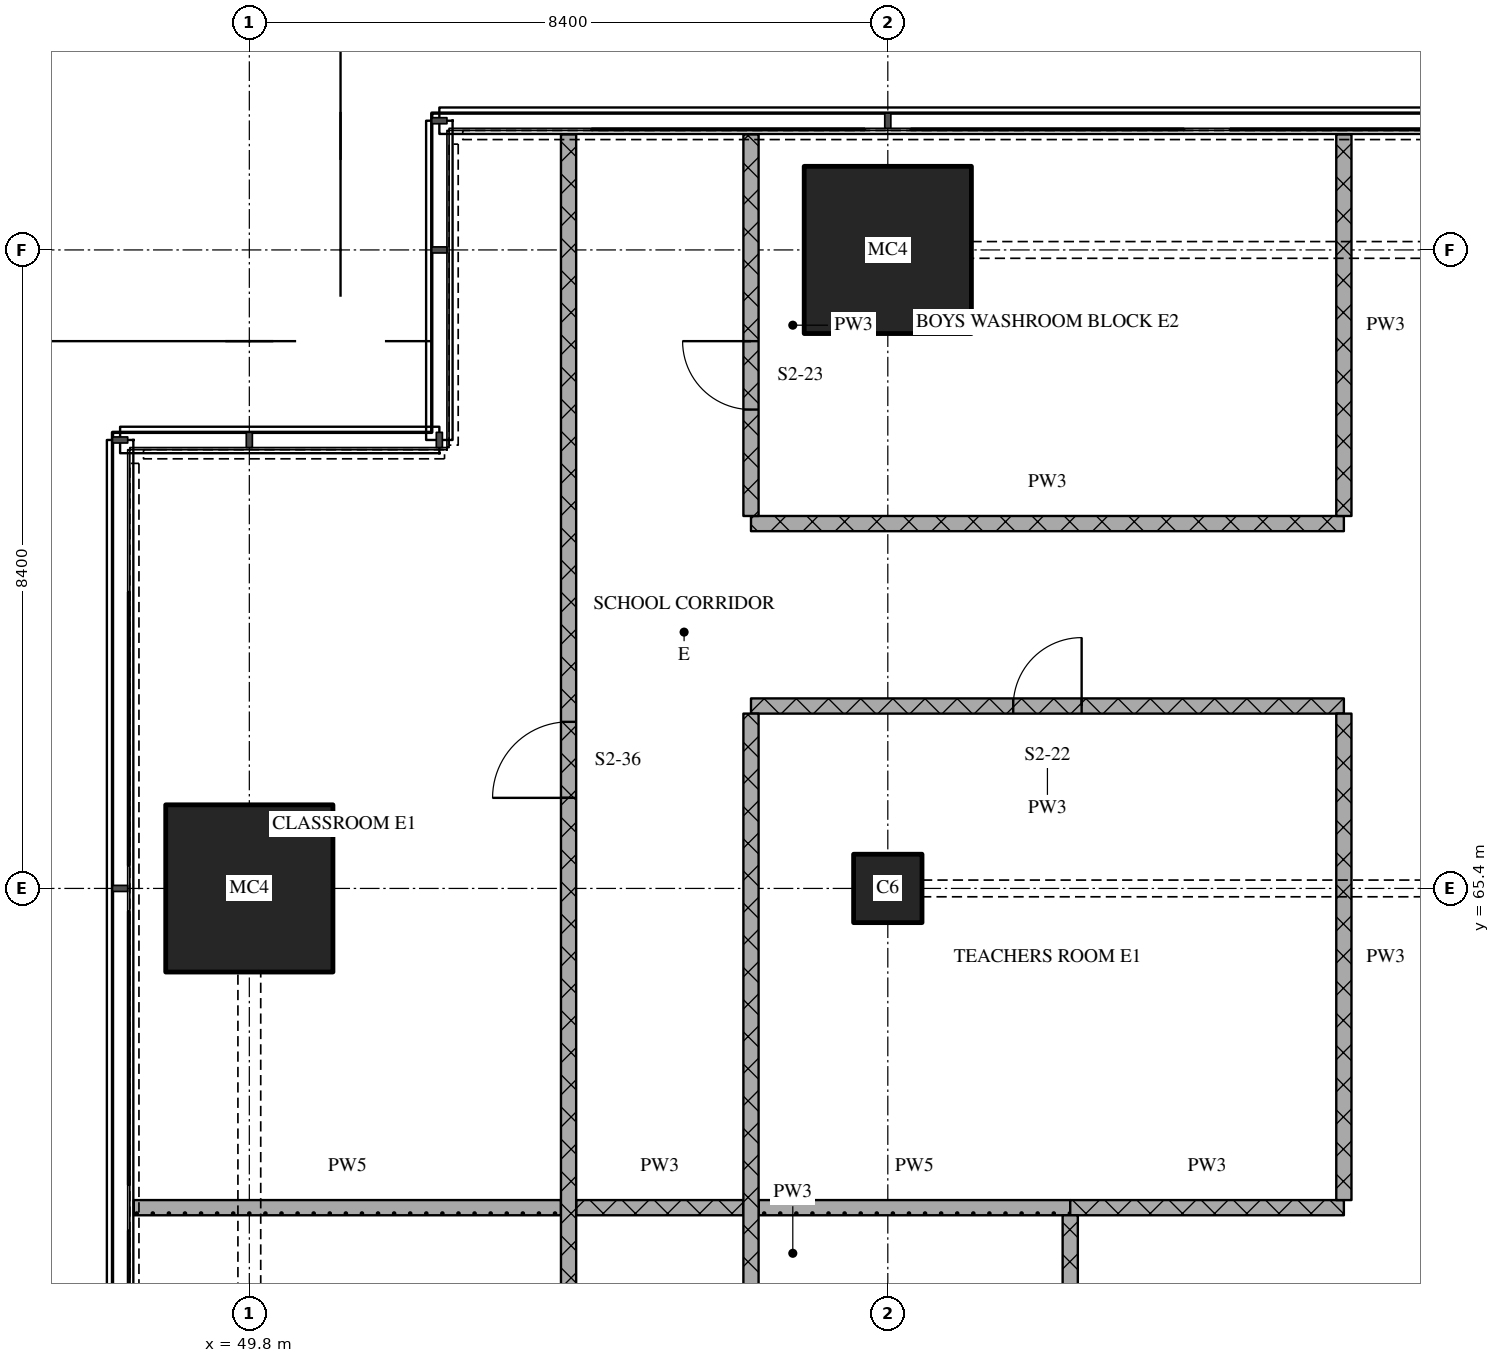
"""IFC4 building model, lengths in metres.
Left out: names, types, materials, properties, quantities, classifications, styles, units other than length and angle.
Written with IfcOpenShell. Run it as: python <this file> out.ifc"""

import sys

from ifc_helpers import new_model, si_unit, direction, frame, frame_2d, origin, origin_2d, place, context, subcontext, project, spatial, rectangle, extrude, element, fill, save


model = new_model("IFC4")
c1 = context("Model", 3, precision=1e-05, world=origin(), true_north=direction((0.0, 1.0)))
c2 = subcontext(c1, "Body", "Model", "MODEL_VIEW")
j1 = project(units=[si_unit("LENGTHUNIT", "METRE"), si_unit("PLANEANGLEUNIT", "RADIAN")], contexts=[c1])
p1 = place(None, origin())
s1 = spatial("IfcSite", under=j1, at=p1, CompositionType="ELEMENT")
p2 = place(p1, origin())
s2 = spatial("IfcBuilding", under=s1, at=p2, CompositionType="ELEMENT")
p3 = place(p2, frame((0.0, 0.0, 23.7)))
s3 = spatial("IfcBuildingStorey", under=s2, at=p3, CompositionType="ELEMENT", Elevation=23.7)
p4 = place(p3, frame((49.8, 65.4, 0.0), z_axis=(0.0, 0.0, 1.0), x_axis=(1.0, 0.0, 0.0)))
e1 = element("IfcColumn", 1, at=p4, inside=s3, PredefinedType="COLUMN", context=c2, shape_type="SweptSolid", body=[
    extrude(rectangle(XDim=2.2, YDim=2.2, at=origin_2d()), origin(), (0.0, 0.0, 1.0), 4.5),
])
p5 = place(p3, frame((58.2, 65.4, 0.0), z_axis=(0.0, 0.0, 1.0), x_axis=(1.0, 0.0, 0.0)))
e2 = element("IfcColumn", 2, at=p5, inside=s3, PredefinedType="COLUMN", context=c2, shape_type="SweptSolid", body=[
    extrude(rectangle(XDim=0.9, YDim=0.9, at=origin_2d()), origin(), (0.0, 0.0, 1.0), 4.5),
])
p6 = place(p3, frame((58.2, 73.8, 0.0), z_axis=(0.0, 0.0, 1.0), x_axis=(1.0, 0.0, 0.0)))
e3 = element("IfcColumn", 3, at=p6, inside=s3, PredefinedType="COLUMN", context=c2, shape_type="SweptSolid", body=[
    extrude(rectangle(XDim=2.2, YDim=2.2, at=origin_2d()), origin(), (0.0, 0.0, 1.0), 4.5),
])
p7 = place(p3, frame((54.1, 61.2, 0.0), z_axis=(0.0, 0.0, 1.0), x_axis=(1.0, 0.0, 0.0)))
e4 = element("IfcWall", 4, at=p7, inside=s3, PredefinedType="PARTITIONING", context=c2, shape_type="SweptSolid", body=[
    extrude(rectangle(XDim=2.2, YDim=0.2, at=frame_2d((1.1, 0.0))), origin(), (0.0, 0.0, 1.0), 4.2),
])
p8 = place(p3, frame((60.6, 61.2, 0.0), z_axis=(0.0, 0.0, 1.0), x_axis=(1.0, 0.0, 0.0)))
e5 = element("IfcWall", 5, at=p8, inside=s3, PredefinedType="PARTITIONING", context=c2, shape_type="SweptSolid", body=[
    extrude(rectangle(XDim=3.6, YDim=0.2, at=frame_2d((1.8, 0.0))), origin(), (0.0, 0.0, 1.0), 4.2),
])
p9 = place(p3, frame((48.28, 61.2, 0.0), z_axis=(0.0, 0.0, 1.0), x_axis=(1.0, 0.0, 0.0)))
e6 = element("IfcWall", 6, at=p9, inside=s3, PredefinedType="PARTITIONING", context=c2, shape_type="SweptSolid", body=[
    extrude(rectangle(XDim=5.62, YDim=0.2, at=frame_2d((2.81, 0.0))), origin(), (0.0, 0.0, 1.0), 4.2),
])
p10 = place(p3, frame((56.5, 61.2, 0.0), z_axis=(0.0, 0.0, 1.0), x_axis=(1.0, 0.0, 0.0)))
e7 = element("IfcWall", 7, at=p10, inside=s3, PredefinedType="PARTITIONING", context=c2, shape_type="SweptSolid", body=[
    extrude(rectangle(XDim=4.1, YDim=0.2, at=frame_2d((2.05, 0.0))), origin(), (0.0, 0.0, 1.0), 4.2),
])
p11 = place(p3, frame((64.2, 67.8, 0.0), z_axis=(0.0, 0.0, 1.0), x_axis=(-1.0, 0.0, 0.0)))
e8 = element("IfcWall", 8, at=p11, inside=s3, PredefinedType="PARTITIONING", context=c2, shape_type="SweptSolid", body=[
    extrude(rectangle(XDim=7.8, YDim=0.2, at=frame_2d((3.9, 0.0))), origin(), (0.0, 0.0, 1.0), 4.2),
])
p12 = place(p11, frame((3.45, 0.0, 0.0)))
e9 = element("IfcOpeningElement", 9, at=p12, cuts=e8, PredefinedType="OPENING", context=c2, shape_type="SweptSolid", body=[
    extrude(rectangle(XDim=0.9, YDim=2.1, at=frame_2d((0.45, 1.05))), frame((0.0, 0.11, 0.0), z_axis=(0.0, -1.0, 0.0), x_axis=(1.0, 0.0, 0.0)), (0.0, 0.0, 1.0), 0.22),
])
p13 = place(p3, frame((56.4, 70.2, 0.0), z_axis=(0.0, 0.0, 1.0), x_axis=(1.0, 0.0, 0.0)))
e10 = element("IfcWall", 10, at=p13, inside=s3, PredefinedType="PARTITIONING", context=c2, shape_type="SweptSolid", body=[
    extrude(rectangle(XDim=7.8, YDim=0.2, at=frame_2d((3.9, 0.0))), origin(), (0.0, 0.0, 1.0), 4.2),
])
p14 = place(p3, frame((54.0, 43.3, 0.0), z_axis=(0.0, 0.0, 1.0), x_axis=(0.0, 1.0, 0.0)))
e11 = element("IfcWall", 11, at=p14, inside=s3, PredefinedType="PARTITIONING", context=c2, shape_type="SweptSolid", body=[
    extrude(rectangle(XDim=32.02, YDim=0.2, at=frame_2d((16.01, 0.0))), origin(), (0.0, 0.0, 1.0), 4.2),
])
p15 = place(p14, frame((8.4, 0.0, 0.0)))
e12 = element("IfcOpeningElement", 12, at=p15, cuts=e11, PredefinedType="OPENING", context=c2, shape_type="SweptSolid", body=[
    extrude(rectangle(XDim=1.0, YDim=2.1, at=frame_2d((0.5, 1.05))), frame((0.0, 0.11, 0.0), z_axis=(0.0, -1.0, 0.0), x_axis=(1.0, 0.0, 0.0)), (0.0, 0.0, 1.0), 0.22),
])
p16 = place(p14, frame((23.292, 0.0, 0.0)))
e13 = element("IfcOpeningElement", 13, at=p16, cuts=e11, PredefinedType="OPENING", context=c2, shape_type="SweptSolid", body=[
    extrude(rectangle(XDim=1.0, YDim=2.1, at=frame_2d((0.5, 1.05))), frame((0.0, 0.11, 0.0), z_axis=(0.0, -1.0, 0.0), x_axis=(1.0, 0.0, 0.0)), (0.0, 0.0, 1.0), 0.22),
])
p17 = place(p3, frame((56.4, 67.7, 0.0), z_axis=(0.0, 0.0, 1.0), x_axis=(0.0, -1.0, 0.0)))
e14 = element("IfcWall", 14, at=p17, inside=s3, PredefinedType="PARTITIONING", context=c2, shape_type="SweptSolid", body=[
    extrude(rectangle(XDim=14.2, YDim=0.2, at=frame_2d((7.1, 0.0))), origin(), (0.0, 0.0, 1.0), 4.2),
])
p18 = place(p17, frame((7.55, 0.0, 0.0)))
e15 = element("IfcOpeningElement", 15, at=p18, cuts=e14, PredefinedType="OPENING", context=c2, shape_type="SweptSolid", body=[
    extrude(rectangle(XDim=0.9, YDim=2.1, at=frame_2d((0.45, 1.05))), frame((0.0, 0.11, 0.0), z_axis=(0.0, -1.0, 0.0), x_axis=(1.0, 0.0, 0.0)), (0.0, 0.0, 1.0), 0.22),
])
p19 = place(p17, frame((11.45, 0.0, 0.0)))
e16 = element("IfcOpeningElement", 16, at=p19, cuts=e14, PredefinedType="OPENING", context=c2, shape_type="SweptSolid", body=[
    extrude(rectangle(XDim=0.9, YDim=2.1, at=frame_2d((0.45, 1.05))), frame((0.0, 0.11, 0.0), z_axis=(0.0, -1.0, 0.0), x_axis=(1.0, 0.0, 0.0)), (0.0, 0.0, 1.0), 0.22),
])
p20 = place(p3, frame((56.4, 75.32, 0.0), z_axis=(0.0, 0.0, 1.0), x_axis=(0.0, -1.0, 0.0)))
e17 = element("IfcWall", 17, at=p20, inside=s3, PredefinedType="PARTITIONING", context=c2, shape_type="SweptSolid", body=[
    extrude(rectangle(XDim=5.02, YDim=0.2, at=frame_2d((2.51, 0.0))), origin(), (0.0, 0.0, 1.0), 4.2),
])
p21 = place(p20, frame((2.72, 0.0, 0.0)))
e18 = element("IfcOpeningElement", 18, at=p21, cuts=e17, PredefinedType="OPENING", context=c2, shape_type="SweptSolid", body=[
    extrude(rectangle(XDim=0.9, YDim=2.1, at=frame_2d((0.45, 1.05))), frame((0.0, 0.11, 0.0), z_axis=(0.0, -1.0, 0.0), x_axis=(1.0, 0.0, 0.0)), (0.0, 0.0, 1.0), 0.22),
])
p22 = place(p3, frame((60.6, 61.1, 0.0), z_axis=(0.0, 0.0, 1.0), x_axis=(0.0, -1.0, 0.0)))
e19 = element("IfcWall", 19, at=p22, inside=s3, PredefinedType="PARTITIONING", context=c2, shape_type="SweptSolid", body=[
    extrude(rectangle(XDim=7.6, YDim=0.2, at=frame_2d((3.8, 0.0))), origin(), (0.0, 0.0, 1.0), 4.2),
])
p23 = place(p3, frame((64.2, 67.7, 0.0), z_axis=(0.0, 0.0, 1.0), x_axis=(0.0, -1.0, 0.0)))
e20 = element("IfcWall", 20, at=p23, inside=s3, PredefinedType="PARTITIONING", context=c2, shape_type="SweptSolid", body=[
    extrude(rectangle(XDim=6.4, YDim=0.2, at=frame_2d((3.2, 0.0))), origin(), (0.0, 0.0, 1.0), 4.2),
])
p24 = place(p3, frame((64.2, 75.32, 0.0), z_axis=(0.0, 0.0, 1.0), x_axis=(0.0, -1.0, 0.0)))
e21 = element("IfcWall", 21, at=p24, inside=s3, PredefinedType="PARTITIONING", context=c2, shape_type="SweptSolid", body=[
    extrude(rectangle(XDim=5.02, YDim=0.2, at=frame_2d((2.51, 0.0))), origin(), (0.0, 0.0, 1.0), 4.2),
])
p25 = place(p12, origin())
e22 = element("IfcDoor", 22, at=p25, inside=s3, OperationType="SINGLE_SWING_RIGHT", PredefinedType="DOOR", context=c2, shape_type="SweptSolid", body=[
    extrude(rectangle(XDim=0.9, YDim=2.1, at=frame_2d((0.45, 1.05))), frame((0.0, 0.025, 0.0), z_axis=(0.0, -1.0, 0.0), x_axis=(1.0, 0.0, 0.0)), (0.0, 0.0, 1.0), 0.05),
])
fill(e9, e22)
p26 = place(p16, origin())
e23 = element("IfcDoor", 23, at=p26, inside=s3, OperationType="SINGLE_SWING_LEFT", PredefinedType="DOOR", context=c2, shape_type="SweptSolid", body=[
    extrude(rectangle(XDim=1.0, YDim=2.1, at=frame_2d((0.5, 1.05))), frame((0.0, 0.025, 0.0), z_axis=(0.0, -1.0, 0.0), x_axis=(1.0, 0.0, 0.0)), (0.0, 0.0, 1.0), 0.05),
])
fill(e13, e23)
p27 = place(p21, origin())
e24 = element("IfcDoor", 24, at=p27, inside=s3, OperationType="SINGLE_SWING_RIGHT", PredefinedType="DOOR", context=c2, shape_type="SweptSolid", body=[
    extrude(rectangle(XDim=0.9, YDim=2.1, at=frame_2d((0.45, 1.05))), frame((0.0, 0.025, 0.0), z_axis=(0.0, -1.0, 0.0), x_axis=(1.0, 0.0, 0.0)), (0.0, 0.0, 1.0), 0.05),
])
fill(e18, e24)
save(model, sys.argv[1])
